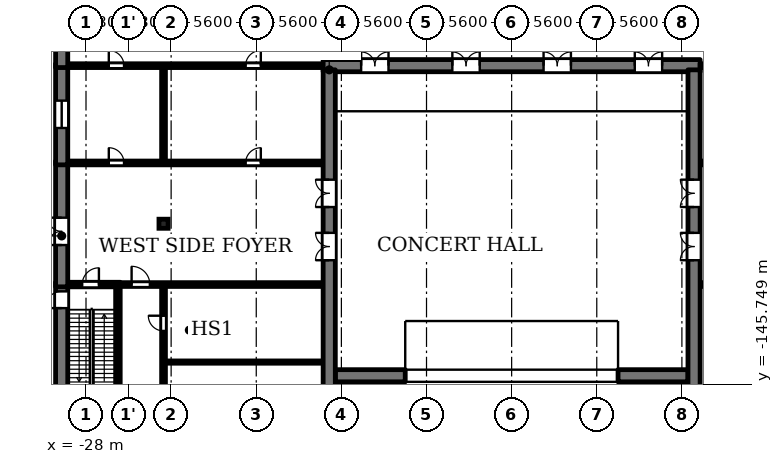
"""IFC4 building model, lengths in metres.
Left out: names, types, materials, properties, quantities, classifications, styles, units other than length and angle.
Written with IfcOpenShell. Run it as: python <this file> out.ifc"""

import sys

from ifc_helpers import new_model, si_unit, direction, frame, frame_2d, origin, origin_2d, place, context, subcontext, project, spatial, rectangle, extrude, element, fill, save


model = new_model("IFC4")
c1 = context("Model", 3, precision=1e-05, world=origin(), true_north=direction((0.0, 1.0)))
c2 = subcontext(c1, "Body", "Model", "MODEL_VIEW")
j1 = project(units=[si_unit("LENGTHUNIT", "METRE"), si_unit("PLANEANGLEUNIT", "RADIAN")], contexts=[c1])
p1 = place(None, origin())
s1 = spatial("IfcSite", under=j1, at=p1, CompositionType="ELEMENT")
p2 = place(p1, origin())
s2 = spatial("IfcBuilding", under=s1, at=p2, CompositionType="ELEMENT")
p3 = place(p2, origin())
s3 = spatial("IfcBuildingStorey", under=s2, at=p3, CompositionType="ELEMENT", Elevation=0.0)
p4 = place(p3, frame((-22.9, -135.2, 0.0), z_axis=(0.0, 0.0, 1.0), x_axis=(1.0, 0.0, 0.0)))
e1 = element("IfcColumn", 1, at=p4, inside=s3, PredefinedType="COLUMN", context=c2, shape_type="SweptSolid", body=[
    extrude(rectangle(XDim=0.6, YDim=0.6, at=origin_2d()), origin(), (0.0, 0.0, 1.0), 6.15),
])
for number, where, z_axis, x_axis in (
    (2, (-11.6, -145.2, 0.0), (0.0, 0.0, 1.0), (1.0, 0.0, 0.0)),
    (3, (7.0, -145.2, 0.0), (0.0, 0.0, 1.0), (1.0, 0.0, 0.0)),
):
    element("IfcWall", number, at=place(p3, frame(where, z_axis=z_axis, x_axis=x_axis)), inside=s3, PredefinedType="SOLIDWALL", context=c2, shape_type="SweptSolid", body=[
        extrude(rectangle(XDim=4.6, YDim=0.8, at=frame_2d((2.3, 0.0))), origin(), (0.0, 0.0, 1.0), 6.5),
    ])
p5 = place(p3, frame((-22.775, -144.3, 0.0), z_axis=(0.0, 0.0, 1.0), x_axis=(1.0, 0.0, 0.0)))
e4 = element("IfcWall", 4, at=p5, inside=s3, PredefinedType="PARTITIONING", context=c2, shape_type="SweptSolid", body=[
    extrude(rectangle(XDim=10.375, YDim=0.15, at=frame_2d((5.188, 0.0))), origin(), (0.0, 0.0, 1.0), 6.15),
])
p6 = place(p3, frame((-29.2, -139.2, 0.0), z_axis=(0.0, 0.0, 1.0), x_axis=(1.0, 0.0, 0.0)))
e5 = element("IfcWall", 5, at=p6, inside=s3, PredefinedType="SOLIDWALL", context=c2, shape_type="SweptSolid", body=[
    extrude(rectangle(XDim=3.45, YDim=0.3, at=frame_2d((1.725, 0.0))), origin(), (0.0, 0.0, 1.0), 6.15),
])
p7 = place(p6, frame((0.95, 0.0, 0.0)))
e6 = element("IfcOpeningElement", 6, at=p7, cuts=e5, PredefinedType="OPENING", context=c2, shape_type="SweptSolid", body=[
    extrude(rectangle(XDim=1.1, YDim=2.1, at=frame_2d((0.55, 1.05))), frame((0.0, 0.16, 0.0), z_axis=(0.0, -1.0, 0.0), x_axis=(1.0, 0.0, 0.0)), (0.0, 0.0, 1.0), 0.32),
])
p8 = place(p3, frame((-25.75, -139.2, 0.0), z_axis=(0.0, 0.0, 1.0), x_axis=(1.0, 0.0, 0.0)))
e7 = element("IfcWall", 7, at=p8, inside=s3, PredefinedType="SOLIDWALL", context=c2, shape_type="SweptSolid", body=[
    extrude(rectangle(XDim=13.35, YDim=0.25, at=frame_2d((6.675, 0.0))), origin(), (0.0, 0.0, 1.0), 6.15),
])
p9 = place(p8, frame((0.75, 0.0, 0.0)))
e8 = element("IfcOpeningElement", 8, at=p9, cuts=e7, PredefinedType="OPENING", context=c2, shape_type="SweptSolid", body=[
    extrude(rectangle(XDim=1.2, YDim=2.1, at=frame_2d((0.6, 1.05))), frame((0.0, 0.135, 0.0), z_axis=(0.0, -1.0, 0.0), x_axis=(1.0, 0.0, 0.0)), (0.0, 0.0, 1.0), 0.27),
])
p10 = place(p3, frame((12.4, -139.2, 0.0), z_axis=(0.0, 0.0, 1.0), x_axis=(1.0, 0.0, 0.0)))
e9 = element("IfcWall", 9, at=p10, inside=s3, PredefinedType="SOLIDWALL", context=c2, shape_type="SweptSolid", body=[
    extrude(rectangle(XDim=13.35, YDim=0.25, at=frame_2d((6.675, 0.0))), origin(), (0.0, 0.0, 1.0), 6.15),
])
p11 = place(p10, frame((5.1, 0.0, 0.0)))
e10 = element("IfcOpeningElement", 10, at=p11, cuts=e9, PredefinedType="OPENING", context=c2, shape_type="SweptSolid", body=[
    extrude(rectangle(XDim=1.0, YDim=2.1, at=frame_2d((0.5, 1.05))), frame((0.0, 0.135, 0.0), z_axis=(0.0, -1.0, 0.0), x_axis=(1.0, 0.0, 0.0)), (0.0, 0.0, 1.0), 0.27),
])
p12 = place(p3, frame((-29.2, -131.2, 0.0), z_axis=(0.0, 0.0, 1.0), x_axis=(1.0, 0.0, 0.0)))
e11 = element("IfcWall", 11, at=p12, inside=s3, PredefinedType="SOLIDWALL", context=c2, shape_type="SweptSolid", body=[
    extrude(rectangle(XDim=16.8, YDim=0.25, at=frame_2d((8.4, 0.0))), origin(), (0.0, 0.0, 1.0), 6.15),
])
p13 = place(p12, frame((2.7, 0.0, 0.0)))
e12 = element("IfcOpeningElement", 12, at=p13, cuts=e11, PredefinedType="OPENING", context=c2, shape_type="SweptSolid", body=[
    extrude(rectangle(XDim=1.0, YDim=2.1, at=frame_2d((0.5, 1.05))), frame((0.0, 0.135, 0.0), z_axis=(0.0, -1.0, 0.0), x_axis=(1.0, 0.0, 0.0)), (0.0, 0.0, 1.0), 0.27),
])
p14 = place(p12, frame((11.7, 0.0, 0.0)))
e13 = element("IfcOpeningElement", 13, at=p14, cuts=e11, PredefinedType="OPENING", context=c2, shape_type="SweptSolid", body=[
    extrude(rectangle(XDim=1.0, YDim=2.1, at=frame_2d((0.5, 1.05))), frame((0.0, 0.135, 0.0), z_axis=(0.0, -1.0, 0.0), x_axis=(1.0, 0.0, 0.0)), (0.0, 0.0, 1.0), 0.27),
])
p15 = place(p3, frame((12.4, -131.2, 0.0), z_axis=(0.0, 0.0, 1.0), x_axis=(1.0, 0.0, 0.0)))
e14 = element("IfcWall", 14, at=p15, inside=s3, PredefinedType="SOLIDWALL", context=c2, shape_type="SweptSolid", body=[
    extrude(rectangle(XDim=16.8, YDim=0.25, at=frame_2d((8.4, 0.0))), origin(), (0.0, 0.0, 1.0), 6.15),
])
p16 = place(p3, frame((-29.2, -124.8, 0.0), z_axis=(0.0, 0.0, 1.0), x_axis=(1.0, 0.0, 0.0)))
e15 = element("IfcWall", 15, at=p16, inside=s3, PredefinedType="SOLIDWALL", context=c2, shape_type="SweptSolid", body=[
    extrude(rectangle(XDim=16.8, YDim=0.25, at=frame_2d((8.4, 0.0))), origin(), (0.0, 0.0, 1.0), 6.15),
])
p17 = place(p16, frame((2.7, 0.0, 0.0)))
e16 = element("IfcOpeningElement", 16, at=p17, cuts=e15, PredefinedType="OPENING", context=c2, shape_type="SweptSolid", body=[
    extrude(rectangle(XDim=1.0, YDim=2.1, at=frame_2d((0.5, 1.05))), frame((0.0, 0.135, 0.0), z_axis=(0.0, -1.0, 0.0), x_axis=(1.0, 0.0, 0.0)), (0.0, 0.0, 1.0), 0.27),
])
p18 = place(p16, frame((11.7, 0.0, 0.0)))
e17 = element("IfcOpeningElement", 17, at=p18, cuts=e15, PredefinedType="OPENING", context=c2, shape_type="SweptSolid", body=[
    extrude(rectangle(XDim=1.0, YDim=2.1, at=frame_2d((0.5, 1.05))), frame((0.0, 0.135, 0.0), z_axis=(0.0, -1.0, 0.0), x_axis=(1.0, 0.0, 0.0)), (0.0, 0.0, 1.0), 0.27),
])
p19 = place(p3, frame((-12.4, -124.8, 0.0), z_axis=(0.0, 0.0, 1.0), x_axis=(1.0, 0.0, 0.0)))
e18 = element("IfcWall", 18, at=p19, inside=s3, PredefinedType="SOLIDWALL", context=c2, shape_type="SweptSolid", body=[
    extrude(rectangle(XDim=24.8, YDim=0.8, at=frame_2d((12.4, 0.0))), origin(), (0.0, 0.0, 1.0), 6.5),
])
p20 = place(p19, frame((2.5, 0.0, 0.0)))
e19 = element("IfcOpeningElement", 19, at=p20, cuts=e18, PredefinedType="OPENING", context=c2, shape_type="SweptSolid", body=[
    extrude(rectangle(XDim=1.8, YDim=2.2, at=frame_2d((0.9, 1.1))), frame((0.0, 0.41, 0.0), z_axis=(0.0, -1.0, 0.0), x_axis=(1.0, 0.0, 0.0)), (0.0, 0.0, 1.0), 0.82),
])
p21 = place(p19, frame((8.5, 0.0, 0.0)))
e20 = element("IfcOpeningElement", 20, at=p21, cuts=e18, PredefinedType="OPENING", context=c2, shape_type="SweptSolid", body=[
    extrude(rectangle(XDim=1.8, YDim=2.2, at=frame_2d((0.9, 1.1))), frame((0.0, 0.41, 0.0), z_axis=(0.0, -1.0, 0.0), x_axis=(1.0, 0.0, 0.0)), (0.0, 0.0, 1.0), 0.82),
])
p22 = place(p19, frame((14.5, 0.0, 0.0)))
e21 = element("IfcOpeningElement", 21, at=p22, cuts=e18, PredefinedType="OPENING", context=c2, shape_type="SweptSolid", body=[
    extrude(rectangle(XDim=1.8, YDim=2.2, at=frame_2d((0.9, 1.1))), frame((0.0, 0.41, 0.0), z_axis=(0.0, -1.0, 0.0), x_axis=(1.0, 0.0, 0.0)), (0.0, 0.0, 1.0), 0.82),
])
p23 = place(p19, frame((20.5, 0.0, 0.0)))
e22 = element("IfcOpeningElement", 22, at=p23, cuts=e18, PredefinedType="OPENING", context=c2, shape_type="SweptSolid", body=[
    extrude(rectangle(XDim=1.8, YDim=2.2, at=frame_2d((0.9, 1.1))), frame((0.0, 0.41, 0.0), z_axis=(0.0, -1.0, 0.0), x_axis=(1.0, 0.0, 0.0)), (0.0, 0.0, 1.0), 0.82),
])
p24 = place(p3, frame((12.4, -124.8, 0.0), z_axis=(0.0, 0.0, 1.0), x_axis=(1.0, 0.0, 0.0)))
e23 = element("IfcWall", 23, at=p24, inside=s3, PredefinedType="SOLIDWALL", context=c2, shape_type="SweptSolid", body=[
    extrude(rectangle(XDim=16.8, YDim=0.25, at=frame_2d((8.4, 0.0))), origin(), (0.0, 0.0, 1.0), 6.15),
])
p25 = place(p24, frame((4.1, 0.0, 0.0)))
e24 = element("IfcOpeningElement", 24, at=p25, cuts=e23, PredefinedType="OPENING", context=c2, shape_type="SweptSolid", body=[
    extrude(rectangle(XDim=1.0, YDim=2.1, at=frame_2d((0.5, 1.05))), frame((0.0, 0.135, 0.0), z_axis=(0.0, -1.0, 0.0), x_axis=(1.0, 0.0, 0.0)), (0.0, 0.0, 1.0), 0.27),
])
p26 = place(p3, frame((-29.6, -147.75, 0.0), z_axis=(0.0, 0.0, 1.0), x_axis=(0.0, 1.0, 0.0)))
e25 = element("IfcWall", 25, at=p26, inside=s3, PredefinedType="SOLIDWALL", context=c2, shape_type="SweptSolid", body=[
    extrude(rectangle(XDim=8.7, YDim=0.8, at=frame_2d((4.35, 0.0))), origin(), (0.0, 0.0, 1.0), 6.15),
])
p27 = place(p26, frame((7.0, 0.0, 0.0)))
e26 = element("IfcOpeningElement", 26, at=p27, cuts=e25, PredefinedType="OPENING", context=c2, shape_type="SweptSolid", body=[
    extrude(rectangle(XDim=1.1, YDim=2.1, at=frame_2d((0.55, 1.05))), frame((0.0, 0.41, 0.0), z_axis=(0.0, -1.0, 0.0), x_axis=(1.0, 0.0, 0.0)), (0.0, 0.0, 1.0), 0.82),
])
p28 = place(p3, frame((-29.6, -139.35, 0.0), z_axis=(0.0, 0.0, 1.0), x_axis=(0.0, 1.0, 0.0)))
e27 = element("IfcWall", 27, at=p28, inside=s3, PredefinedType="SOLIDWALL", context=c2, shape_type="SweptSolid", body=[
    extrude(rectangle(XDim=8.275, YDim=0.8, at=frame_2d((4.137, 0.0))), origin(), (0.0, 0.0, 1.0), 6.15),
])
p29 = place(p28, frame((2.75, 0.0, 0.0)))
e28 = element("IfcOpeningElement", 28, at=p29, cuts=e27, PredefinedType="OPENING", context=c2, shape_type="SweptSolid", body=[
    extrude(rectangle(XDim=1.8, YDim=2.1, at=frame_2d((0.9, 1.05))), frame((0.0, 0.41, 0.0), z_axis=(0.0, -1.0, 0.0), x_axis=(1.0, 0.0, 0.0)), (0.0, 0.0, 1.0), 0.82),
])
p30 = place(p3, frame((-29.6, -131.325, 0.0), z_axis=(0.0, 0.0, 1.0), x_axis=(0.0, 1.0, 0.0)))
e29 = element("IfcWall", 29, at=p30, inside=s3, PredefinedType="SOLIDWALL", context=c2, shape_type="SweptSolid", body=[
    extrude(rectangle(XDim=6.65, YDim=0.8, at=frame_2d((3.325, 0.0))), origin(), (0.0, 0.0, 1.0), 6.15),
])
p31 = place(p30, frame((2.425, 0.0, 0.9)))
e30 = element("IfcOpeningElement", 30, at=p31, cuts=e29, PredefinedType="OPENING", context=c2, shape_type="SweptSolid", body=[
    extrude(rectangle(XDim=1.8, YDim=1.5, at=frame_2d((0.9, 0.75))), frame((0.0, 0.41, 0.0), z_axis=(0.0, -1.0, 0.0), x_axis=(1.0, 0.0, 0.0)), (0.0, 0.0, 1.0), 0.82),
])
p32 = place(p3, frame((-29.6, -124.925, 0.0), z_axis=(0.0, 0.0, 1.0), x_axis=(0.0, 1.0, 0.0)))
e31 = element("IfcWall", 31, at=p32, inside=s3, PredefinedType="SOLIDWALL", context=c2, shape_type="SweptSolid", body=[
    extrude(rectangle(XDim=3.875, YDim=0.8, at=frame_2d((1.938, 0.0))), origin(), (0.0, 0.0, 1.0), 6.15),
])
p33 = place(p3, frame((-25.9, -147.45, 0.0), z_axis=(0.0, 0.0, 1.0), x_axis=(0.0, 1.0, 0.0)))
e32 = element("IfcWall", 32, at=p33, inside=s3, PredefinedType="SOLIDWALL", context=c2, shape_type="SweptSolid", body=[
    extrude(rectangle(XDim=8.225, YDim=0.3, at=frame_2d((4.112, 0.0))), origin(), (0.0, 0.0, 1.0), 6.15),
])
p34 = place(p3, frame((-22.9, -159.2, 0.0), z_axis=(0.0, 0.0, 1.0), x_axis=(0.0, 1.0, 0.0)))
e33 = element("IfcWall", 33, at=p34, inside=s3, PredefinedType="SOLIDWALL", context=c2, shape_type="SweptSolid", body=[
    extrude(rectangle(XDim=19.875, YDim=0.25, at=frame_2d((9.938, 0.0))), origin(), (0.0, 0.0, 1.0), 6.15),
])
p35 = place(p34, frame((16.95, 0.0, 0.0)))
e34 = element("IfcOpeningElement", 34, at=p35, cuts=e33, PredefinedType="OPENING", context=c2, shape_type="SweptSolid", body=[
    extrude(rectangle(XDim=1.0, YDim=2.1, at=frame_2d((0.5, 1.05))), frame((0.0, 0.135, 0.0), z_axis=(0.0, -1.0, 0.0), x_axis=(1.0, 0.0, 0.0)), (0.0, 0.0, 1.0), 0.27),
])
p36 = place(p34, frame((11.85, 0.0, 0.0)))
e35 = element("IfcOpeningElement", 35, at=p36, cuts=e33, PredefinedType="OPENING", context=c2, shape_type="SweptSolid", body=[
    extrude(rectangle(XDim=1.0, YDim=2.1, at=frame_2d((0.5, 1.05))), frame((0.0, 0.135, 0.0), z_axis=(0.0, -1.0, 0.0), x_axis=(1.0, 0.0, 0.0)), (0.0, 0.0, 1.0), 0.27),
])
p37 = place(p34, frame((6.75, 0.0, 0.0)))
e36 = element("IfcOpeningElement", 36, at=p37, cuts=e33, PredefinedType="OPENING", context=c2, shape_type="SweptSolid", body=[
    extrude(rectangle(XDim=1.0, YDim=2.1, at=frame_2d((0.5, 1.05))), frame((0.0, 0.135, 0.0), z_axis=(0.0, -1.0, 0.0), x_axis=(1.0, 0.0, 0.0)), (0.0, 0.0, 1.0), 0.27),
])
p38 = place(p34, frame((1.65, 0.0, 0.0)))
e37 = element("IfcOpeningElement", 37, at=p38, cuts=e33, PredefinedType="OPENING", context=c2, shape_type="SweptSolid", body=[
    extrude(rectangle(XDim=1.0, YDim=2.1, at=frame_2d((0.5, 1.05))), frame((0.0, 0.135, 0.0), z_axis=(0.0, -1.0, 0.0), x_axis=(1.0, 0.0, 0.0)), (0.0, 0.0, 1.0), 0.27),
])
p39 = place(p3, frame((-22.9, -131.075, 0.0), z_axis=(0.0, 0.0, 1.0), x_axis=(0.0, 1.0, 0.0)))
e38 = element("IfcWall", 38, at=p39, inside=s3, PredefinedType="SOLIDWALL", context=c2, shape_type="SweptSolid", body=[
    extrude(rectangle(XDim=6.15, YDim=0.25, at=frame_2d((3.075, 0.0))), origin(), (0.0, 0.0, 1.0), 6.15),
])
p40 = place(p3, frame((-12.0, -159.2, 0.0), z_axis=(0.0, 0.0, 1.0), x_axis=(0.0, 1.0, 0.0)))
e39 = element("IfcWall", 39, at=p40, inside=s3, PredefinedType="SOLIDWALL", context=c2, shape_type="SweptSolid", body=[
    extrude(rectangle(XDim=34.125, YDim=0.8, at=frame_2d((17.062, 0.0))), origin(), (0.0, 0.0, 1.0), 6.5),
])
p41 = place(p40, frame((21.6, 0.0, 0.0)))
e40 = element("IfcOpeningElement", 40, at=p41, cuts=e39, PredefinedType="OPENING", context=c2, shape_type="SweptSolid", body=[
    extrude(rectangle(XDim=1.8, YDim=2.2, at=frame_2d((0.9, 1.1))), frame((0.0, 0.41, 0.0), z_axis=(0.0, -1.0, 0.0), x_axis=(1.0, 0.0, 0.0)), (0.0, 0.0, 1.0), 0.82),
])
p42 = place(p40, frame((25.1, 0.0, 0.0)))
e41 = element("IfcOpeningElement", 41, at=p42, cuts=e39, PredefinedType="OPENING", context=c2, shape_type="SweptSolid", body=[
    extrude(rectangle(XDim=1.8, YDim=2.2, at=frame_2d((0.9, 1.1))), frame((0.0, 0.41, 0.0), z_axis=(0.0, -1.0, 0.0), x_axis=(1.0, 0.0, 0.0)), (0.0, 0.0, 1.0), 0.82),
])
p43 = place(p40, frame((6.75, 0.0, 0.0)))
e42 = element("IfcOpeningElement", 42, at=p43, cuts=e39, PredefinedType="OPENING", context=c2, shape_type="SweptSolid", body=[
    extrude(rectangle(XDim=1.0, YDim=2.1, at=frame_2d((0.5, 1.05))), frame((0.0, 0.41, 0.0), z_axis=(0.0, -1.0, 0.0), x_axis=(1.0, 0.0, 0.0)), (0.0, 0.0, 1.0), 0.82),
])
p44 = place(p40, frame((1.65, 0.0, 0.0)))
e43 = element("IfcOpeningElement", 43, at=p44, cuts=e39, PredefinedType="OPENING", context=c2, shape_type="SweptSolid", body=[
    extrude(rectangle(XDim=1.0, YDim=2.1, at=frame_2d((0.5, 1.05))), frame((0.0, 0.41, 0.0), z_axis=(0.0, -1.0, 0.0), x_axis=(1.0, 0.0, 0.0)), (0.0, 0.0, 1.0), 0.82),
])
p45 = place(p3, frame((12.0, -159.2, 0.0), z_axis=(0.0, 0.0, 1.0), x_axis=(0.0, 1.0, 0.0)))
e44 = element("IfcWall", 44, at=p45, inside=s3, PredefinedType="SOLIDWALL", context=c2, shape_type="SweptSolid", body=[
    extrude(rectangle(XDim=34.125, YDim=0.8, at=frame_2d((17.062, 0.0))), origin(), (0.0, 0.0, 1.0), 6.5),
])
p46 = place(p45, frame((21.6, 0.0, 0.0)))
e45 = element("IfcOpeningElement", 45, at=p46, cuts=e44, PredefinedType="OPENING", context=c2, shape_type="SweptSolid", body=[
    extrude(rectangle(XDim=1.8, YDim=2.2, at=frame_2d((0.9, 1.1))), frame((0.0, 0.41, 0.0), z_axis=(0.0, -1.0, 0.0), x_axis=(1.0, 0.0, 0.0)), (0.0, 0.0, 1.0), 0.82),
])
p47 = place(p45, frame((25.1, 0.0, 0.0)))
e46 = element("IfcOpeningElement", 46, at=p47, cuts=e44, PredefinedType="OPENING", context=c2, shape_type="SweptSolid", body=[
    extrude(rectangle(XDim=1.8, YDim=2.2, at=frame_2d((0.9, 1.1))), frame((0.0, 0.41, 0.0), z_axis=(0.0, -1.0, 0.0), x_axis=(1.0, 0.0, 0.0)), (0.0, 0.0, 1.0), 0.82),
])
p48 = place(p45, frame((3.9, 0.0, 0.0)))
e47 = element("IfcOpeningElement", 47, at=p48, cuts=e44, PredefinedType="OPENING", context=c2, shape_type="SweptSolid", body=[
    extrude(rectangle(XDim=3.0, YDim=3.0, at=frame_2d((1.5, 1.5))), frame((0.0, 0.41, 0.0), z_axis=(0.0, -1.0, 0.0), x_axis=(1.0, 0.0, 0.0)), (0.0, 0.0, 1.0), 0.82),
])
p49 = place(p27, origin())
e48 = element("IfcDoor", 48, at=p49, inside=s3, OperationType="SINGLE_SWING_LEFT", PredefinedType="DOOR", context=c2, shape_type="SweptSolid", body=[
    extrude(rectangle(XDim=1.1, YDim=2.1, at=frame_2d((0.55, 1.05))), frame((0.0, 0.025, 0.0), z_axis=(0.0, -1.0, 0.0), x_axis=(1.0, 0.0, 0.0)), (0.0, 0.0, 1.0), 0.05),
])
fill(e26, e48)
p50 = place(p29, origin())
e49 = element("IfcDoor", 49, at=p50, inside=s3, OperationType="DOUBLE_DOOR_SINGLE_SWING", PredefinedType="DOOR", context=c2, shape_type="SweptSolid", body=[
    extrude(rectangle(XDim=1.8, YDim=2.1, at=frame_2d((0.9, 1.05))), frame((0.0, 0.025, 0.0), z_axis=(0.0, -1.0, 0.0), x_axis=(1.0, 0.0, 0.0)), (0.0, 0.0, 1.0), 0.05),
])
fill(e28, e49)
p51 = place(p31, origin())
e50 = element("IfcWindow", 50, at=p51, inside=s3, PartitioningType="SINGLE_PANEL", PredefinedType="WINDOW", context=c2, shape_type="SweptSolid", body=[
    extrude(rectangle(XDim=1.8, YDim=1.5, at=frame_2d((0.9, 0.75))), frame((0.0, 0.03, 0.0), z_axis=(0.0, -1.0, 0.0), x_axis=(1.0, 0.0, 0.0)), (0.0, 0.0, 1.0), 0.06),
])
fill(e30, e50)
p52 = place(p7, origin())
e51 = element("IfcDoor", 51, at=p52, inside=s3, OperationType="SINGLE_SWING_RIGHT", PredefinedType="DOOR", context=c2, shape_type="SweptSolid", body=[
    extrude(rectangle(XDim=1.1, YDim=2.1, at=frame_2d((0.55, 1.05))), frame((0.0, 0.025, 0.0), z_axis=(0.0, -1.0, 0.0), x_axis=(1.0, 0.0, 0.0)), (0.0, 0.0, 1.0), 0.05),
])
fill(e6, e51)
p53 = place(p20, origin())
e52 = element("IfcDoor", 52, at=p53, inside=s3, OperationType="DOUBLE_DOOR_SINGLE_SWING", PredefinedType="DOOR", context=c2, shape_type="SweptSolid", body=[
    extrude(rectangle(XDim=1.8, YDim=2.2, at=frame_2d((0.9, 1.1))), frame((0.0, 0.025, 0.0), z_axis=(0.0, -1.0, 0.0), x_axis=(1.0, 0.0, 0.0)), (0.0, 0.0, 1.0), 0.05),
])
fill(e19, e52)
p54 = place(p21, origin())
e53 = element("IfcDoor", 53, at=p54, inside=s3, OperationType="DOUBLE_DOOR_SINGLE_SWING", PredefinedType="DOOR", context=c2, shape_type="SweptSolid", body=[
    extrude(rectangle(XDim=1.8, YDim=2.2, at=frame_2d((0.9, 1.1))), frame((0.0, 0.025, 0.0), z_axis=(0.0, -1.0, 0.0), x_axis=(1.0, 0.0, 0.0)), (0.0, 0.0, 1.0), 0.05),
])
fill(e20, e53)
p55 = place(p22, origin())
e54 = element("IfcDoor", 54, at=p55, inside=s3, OperationType="DOUBLE_DOOR_SINGLE_SWING", PredefinedType="DOOR", context=c2, shape_type="SweptSolid", body=[
    extrude(rectangle(XDim=1.8, YDim=2.2, at=frame_2d((0.9, 1.1))), frame((0.0, 0.025, 0.0), z_axis=(0.0, -1.0, 0.0), x_axis=(1.0, 0.0, 0.0)), (0.0, 0.0, 1.0), 0.05),
])
fill(e21, e54)
p56 = place(p23, origin())
e55 = element("IfcDoor", 55, at=p56, inside=s3, OperationType="DOUBLE_DOOR_SINGLE_SWING", PredefinedType="DOOR", context=c2, shape_type="SweptSolid", body=[
    extrude(rectangle(XDim=1.8, YDim=2.2, at=frame_2d((0.9, 1.1))), frame((0.0, 0.025, 0.0), z_axis=(0.0, -1.0, 0.0), x_axis=(1.0, 0.0, 0.0)), (0.0, 0.0, 1.0), 0.05),
])
fill(e22, e55)
p57 = place(p17, origin())
e56 = element("IfcDoor", 56, at=p57, inside=s3, OperationType="SINGLE_SWING_LEFT", PredefinedType="DOOR", context=c2, shape_type="SweptSolid", body=[
    extrude(rectangle(XDim=1.0, YDim=2.1, at=frame_2d((0.5, 1.05))), frame((0.0, 0.025, 0.0), z_axis=(0.0, -1.0, 0.0), x_axis=(1.0, 0.0, 0.0)), (0.0, 0.0, 1.0), 0.05),
])
fill(e16, e56)
p58 = place(p18, origin())
e57 = element("IfcDoor", 57, at=p58, inside=s3, OperationType="SINGLE_SWING_RIGHT", PredefinedType="DOOR", context=c2, shape_type="SweptSolid", body=[
    extrude(rectangle(XDim=1.0, YDim=2.1, at=frame_2d((0.5, 1.05))), frame((0.0, 0.025, 0.0), z_axis=(0.0, -1.0, 0.0), x_axis=(1.0, 0.0, 0.0)), (0.0, 0.0, 1.0), 0.05),
])
fill(e17, e57)
p59 = place(p13, origin())
e58 = element("IfcDoor", 58, at=p59, inside=s3, OperationType="SINGLE_SWING_LEFT", PredefinedType="DOOR", context=c2, shape_type="SweptSolid", body=[
    extrude(rectangle(XDim=1.0, YDim=2.1, at=frame_2d((0.5, 1.05))), frame((0.0, 0.025, 0.0), z_axis=(0.0, -1.0, 0.0), x_axis=(1.0, 0.0, 0.0)), (0.0, 0.0, 1.0), 0.05),
])
fill(e12, e58)
p60 = place(p14, origin())
e59 = element("IfcDoor", 59, at=p60, inside=s3, OperationType="SINGLE_SWING_RIGHT", PredefinedType="DOOR", context=c2, shape_type="SweptSolid", body=[
    extrude(rectangle(XDim=1.0, YDim=2.1, at=frame_2d((0.5, 1.05))), frame((0.0, 0.025, 0.0), z_axis=(0.0, -1.0, 0.0), x_axis=(1.0, 0.0, 0.0)), (0.0, 0.0, 1.0), 0.05),
])
fill(e13, e59)
p61 = place(p41, origin())
e60 = element("IfcDoor", 60, at=p61, inside=s3, OperationType="DOUBLE_DOOR_SINGLE_SWING", PredefinedType="DOOR", context=c2, shape_type="SweptSolid", body=[
    extrude(rectangle(XDim=1.8, YDim=2.2, at=frame_2d((0.9, 1.1))), frame((0.0, 0.025, 0.0), z_axis=(0.0, -1.0, 0.0), x_axis=(1.0, 0.0, 0.0)), (0.0, 0.0, 1.0), 0.05),
])
fill(e40, e60)
p62 = place(p42, origin())
e61 = element("IfcDoor", 61, at=p62, inside=s3, OperationType="DOUBLE_DOOR_SINGLE_SWING", PredefinedType="DOOR", context=c2, shape_type="SweptSolid", body=[
    extrude(rectangle(XDim=1.8, YDim=2.2, at=frame_2d((0.9, 1.1))), frame((0.0, 0.025, 0.0), z_axis=(0.0, -1.0, 0.0), x_axis=(1.0, 0.0, 0.0)), (0.0, 0.0, 1.0), 0.05),
])
fill(e41, e61)
p63 = place(p46, origin())
e62 = element("IfcDoor", 62, at=p63, inside=s3, OperationType="DOUBLE_DOOR_SINGLE_SWING", PredefinedType="DOOR", context=c2, shape_type="SweptSolid", body=[
    extrude(rectangle(XDim=1.8, YDim=2.2, at=frame_2d((0.9, 1.1))), frame((0.0, 0.025, 0.0), z_axis=(0.0, -1.0, 0.0), x_axis=(1.0, 0.0, 0.0)), (0.0, 0.0, 1.0), 0.05),
])
fill(e45, e62)
p64 = place(p47, origin())
e63 = element("IfcDoor", 63, at=p64, inside=s3, OperationType="DOUBLE_DOOR_SINGLE_SWING", PredefinedType="DOOR", context=c2, shape_type="SweptSolid", body=[
    extrude(rectangle(XDim=1.8, YDim=2.2, at=frame_2d((0.9, 1.1))), frame((0.0, 0.025, 0.0), z_axis=(0.0, -1.0, 0.0), x_axis=(1.0, 0.0, 0.0)), (0.0, 0.0, 1.0), 0.05),
])
fill(e46, e63)
p65 = place(p9, origin())
e64 = element("IfcDoor", 64, at=p65, inside=s3, OperationType="SINGLE_SWING_LEFT", PredefinedType="DOOR", context=c2, shape_type="SweptSolid", body=[
    extrude(rectangle(XDim=1.2, YDim=2.1, at=frame_2d((0.6, 1.05))), frame((0.0, 0.025, 0.0), z_axis=(0.0, -1.0, 0.0), x_axis=(1.0, 0.0, 0.0)), (0.0, 0.0, 1.0), 0.05),
])
fill(e8, e64)
p66 = place(p35, origin())
e65 = element("IfcDoor", 65, at=p66, inside=s3, OperationType="SINGLE_SWING_RIGHT", PredefinedType="DOOR", context=c2, shape_type="SweptSolid", body=[
    extrude(rectangle(XDim=1.0, YDim=2.1, at=frame_2d((0.5, 1.05))), frame((0.0, 0.025, 0.0), z_axis=(0.0, -1.0, 0.0), x_axis=(1.0, 0.0, 0.0)), (0.0, 0.0, 1.0), 0.05),
])
fill(e34, e65)
save(model, sys.argv[1])
